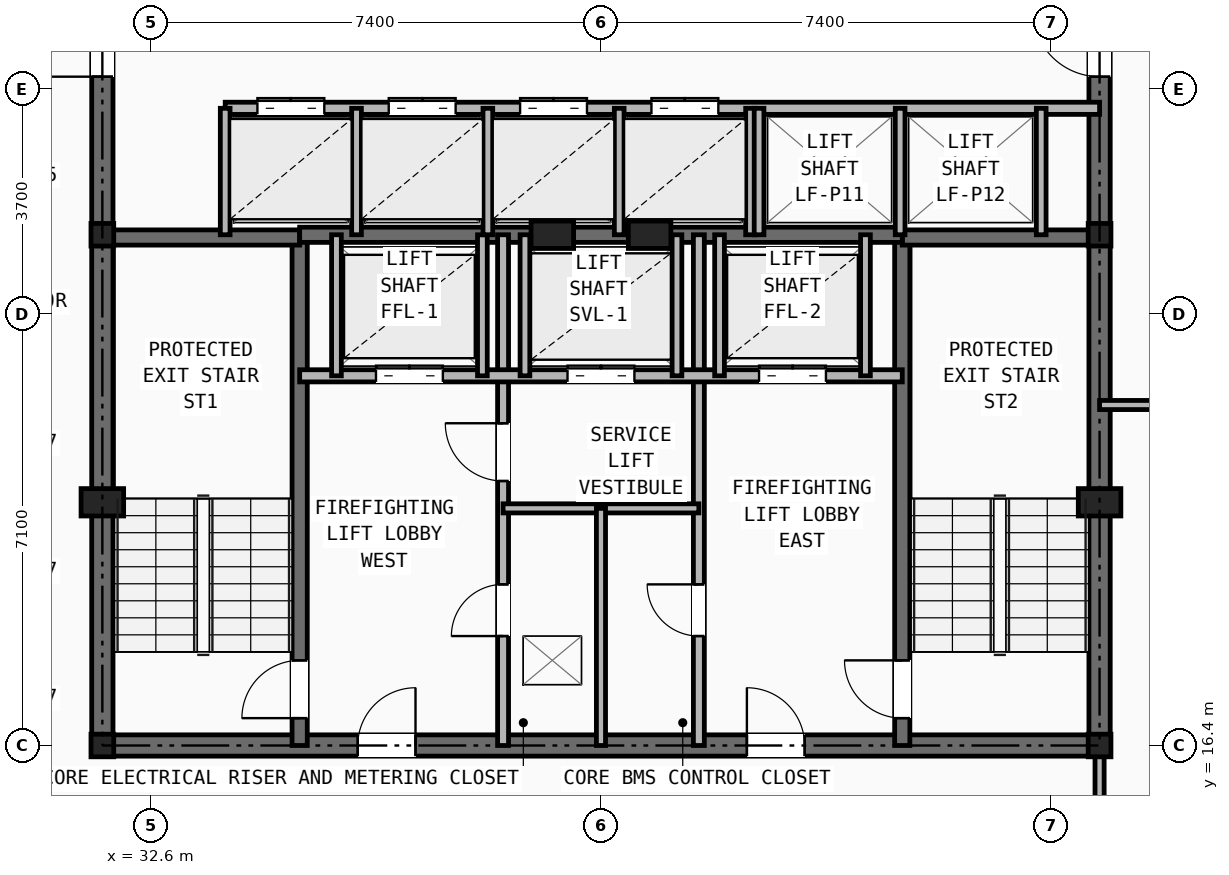
"""IFC4 building model, lengths in metres.
Left out: names, types, materials, properties, quantities, classifications, styles, units other than length and angle.
Written with IfcOpenShell. Run it as: python <this file> out.ifc"""

import sys

from ifc_helpers import new_model, si_unit, direction, frame, frame_2d, origin, origin_2d, place, context, subcontext, project, spatial, rectangle, i_section, extrude, element, fill, save


model = new_model("IFC4")
c1 = context("Model", 3, precision=1e-05, world=origin(), true_north=direction((0.0, 1.0)))
c2 = subcontext(c1, "Body", "Model", "MODEL_VIEW")
j1 = project(units=[si_unit("LENGTHUNIT", "METRE"), si_unit("PLANEANGLEUNIT", "RADIAN")], contexts=[c1])
p1 = place(None, origin())
s1 = spatial("IfcSite", under=j1, at=p1, CompositionType="ELEMENT")
p2 = place(p1, origin())
s2 = spatial("IfcBuilding", under=s1, at=p2, CompositionType="ELEMENT")
p3 = place(p2, frame((0.0, 0.0, 126.35)))
s3 = spatial("IfcBuildingStorey", under=s2, at=p3, CompositionType="ELEMENT", Elevation=126.35)
for number, where, z_axis, x_axis in (
    (1, (31.8, 16.4, 0.0), (0.0, 0.0, 1.0), (1.0, 0.0, 0.0)),
    (2, (48.2, 16.4, 0.0), (0.0, 0.0, 1.0), (1.0, 0.0, 0.0)),
    (3, (31.8, 24.8, 0.0), (0.0, 0.0, 1.0), (1.0, 0.0, 0.0)),
    (4, (48.2, 24.8, 0.0), (0.0, 0.0, 1.0), (1.0, 0.0, 0.0)),
):
    element("IfcColumn", number, at=place(p3, frame(where, z_axis=z_axis, x_axis=x_axis)), inside=s3, PredefinedType="COLUMN", context=c2, shape_type="SweptSolid", body=[
        extrude(i_section(OverallWidth=0.374, OverallDepth=0.372, WebThickness=0.016, FlangeThickness=0.026, at=origin_2d()), origin(), (0.0, 0.0, 1.0), 3.45),
    ])
for number, where, z_axis, x_axis in (
    (5, (31.8, 20.4, 0.0), (0.0, 0.0, 1.0), (1.0, 0.0, 0.0)),
    (6, (48.2, 20.4, 0.0), (0.0, 0.0, 1.0), (1.0, 0.0, 0.0)),
    (7, (39.2, 24.8, 0.0), (0.0, 0.0, 1.0), (1.0, 0.0, 0.0)),
    (8, (40.8, 24.8, 0.0), (0.0, 0.0, 1.0), (1.0, 0.0, 0.0)),
):
    element("IfcColumn", number, at=place(p3, frame(where, z_axis=z_axis, x_axis=x_axis)), inside=s3, PredefinedType="PILASTER", context=c2, shape_type="SweptSolid", body=[
        extrude(rectangle(XDim=0.7, YDim=0.45, at=origin_2d()), origin(), (0.0, 0.0, 1.0), 3.45),
    ])
p4 = place(p3, frame((31.8, 16.4, 0.0), z_axis=(0.0, 0.0, 1.0), x_axis=(1.0, 0.0, 0.0)))
e9 = element("IfcWall", 9, at=p4, inside=s3, PredefinedType="SHEAR", context=c2, shape_type="SweptSolid", body=[
    extrude(rectangle(XDim=16.4, YDim=0.35, at=frame_2d((8.2, 0.0))), origin(), (0.0, 0.0, 1.0), 3.21),
])
p5 = place(p4, frame((4.2, 0.0, 0.0)))
e10 = element("IfcOpeningElement", 10, at=p5, cuts=e9, PredefinedType="OPENING", context=c2, shape_type="SweptSolid", body=[
    extrude(rectangle(XDim=0.95, YDim=2.1, at=frame_2d((0.475, 1.05))), frame((0.0, 0.185, 0.0), z_axis=(0.0, -1.0, 0.0), x_axis=(1.0, 0.0, 0.0)), (0.0, 0.0, 1.0), 0.37),
])
p6 = place(p4, frame((10.6, 0.0, 0.0)))
e11 = element("IfcOpeningElement", 11, at=p6, cuts=e9, PredefinedType="OPENING", context=c2, shape_type="SweptSolid", body=[
    extrude(rectangle(XDim=0.95, YDim=2.1, at=frame_2d((0.475, 1.05))), frame((0.0, 0.185, 0.0), z_axis=(0.0, -1.0, 0.0), x_axis=(1.0, 0.0, 0.0)), (0.0, 0.0, 1.0), 0.37),
])
p7 = place(p3, frame((31.8, 16.4, 0.0), z_axis=(0.0, 0.0, 1.0), x_axis=(0.0, 1.0, 0.0)))
e12 = element("IfcWall", 12, at=p7, inside=s3, PredefinedType="SHEAR", context=c2, shape_type="SweptSolid", body=[
    extrude(rectangle(XDim=14.8, YDim=0.35, at=frame_2d((7.4, 0.0))), origin(), (0.0, 0.0, 1.0), 3.21),
])
p8 = place(p7, frame((11.0, 0.0, 0.0)))
e13 = element("IfcOpeningElement", 13, at=p8, cuts=e12, PredefinedType="OPENING", context=c2, shape_type="SweptSolid", body=[
    extrude(rectangle(XDim=1.1, YDim=2.15, at=frame_2d((0.55, 1.075))), frame((0.0, 0.185, 0.0), z_axis=(0.0, -1.0, 0.0), x_axis=(1.0, 0.0, 0.0)), (0.0, 0.0, 1.0), 0.37),
])
p9 = place(p3, frame((48.2, 16.4, 0.0), z_axis=(0.0, 0.0, 1.0), x_axis=(0.0, 1.0, 0.0)))
e14 = element("IfcWall", 14, at=p9, inside=s3, PredefinedType="SHEAR", context=c2, shape_type="SweptSolid", body=[
    extrude(rectangle(XDim=14.8, YDim=0.35, at=frame_2d((7.4, 0.0))), origin(), (0.0, 0.0, 1.0), 3.21),
])
p10 = place(p9, frame((11.0, 0.0, 0.0)))
e15 = element("IfcOpeningElement", 15, at=p10, cuts=e14, PredefinedType="OPENING", context=c2, shape_type="SweptSolid", body=[
    extrude(rectangle(XDim=1.1, YDim=2.15, at=frame_2d((0.55, 1.075))), frame((0.0, 0.185, 0.0), z_axis=(0.0, -1.0, 0.0), x_axis=(1.0, 0.0, 0.0)), (0.0, 0.0, 1.0), 0.37),
])
p11 = place(p3, frame((35.045, 16.4, 0.0), z_axis=(0.0, 0.0, 1.0), x_axis=(0.0, 1.0, 0.0)))
e16 = element("IfcWall", 16, at=p11, inside=s3, PredefinedType="SHEAR", context=c2, shape_type="SweptSolid", body=[
    extrude(rectangle(XDim=8.4, YDim=0.25, at=frame_2d((4.2, 0.0))), origin(), (0.0, 0.0, 1.0), 3.21),
])
p12 = place(p11, frame((0.45, 0.0, 0.0)))
e17 = element("IfcOpeningElement", 17, at=p12, cuts=e16, PredefinedType="OPENING", context=c2, shape_type="SweptSolid", body=[
    extrude(rectangle(XDim=0.95, YDim=2.1, at=frame_2d((0.475, 1.05))), frame((0.0, 0.135, 0.0), z_axis=(0.0, -1.0, 0.0), x_axis=(1.0, 0.0, 0.0)), (0.0, 0.0, 1.0), 0.27),
])
p13 = place(p3, frame((31.8, 24.755, 0.0), z_axis=(0.0, 0.0, 1.0), x_axis=(1.0, 0.0, 0.0)))
e18 = element("IfcWall", 18, at=p13, inside=s3, PredefinedType="SHEAR", context=c2, shape_type="SweptSolid", body=[
    extrude(rectangle(XDim=3.245, YDim=0.25, at=frame_2d((1.623, 0.0))), origin(), (0.0, 0.0, 1.0), 3.21),
])
p14 = place(p3, frame((44.955, 16.4, 0.0), z_axis=(0.0, 0.0, 1.0), x_axis=(0.0, 1.0, 0.0)))
e19 = element("IfcWall", 19, at=p14, inside=s3, PredefinedType="SHEAR", context=c2, shape_type="SweptSolid", body=[
    extrude(rectangle(XDim=8.4, YDim=0.25, at=frame_2d((4.2, 0.0))), origin(), (0.0, 0.0, 1.0), 3.21),
])
p15 = place(p14, frame((0.45, 0.0, 0.0)))
e20 = element("IfcOpeningElement", 20, at=p15, cuts=e19, PredefinedType="OPENING", context=c2, shape_type="SweptSolid", body=[
    extrude(rectangle(XDim=0.95, YDim=2.1, at=frame_2d((0.475, 1.05))), frame((0.0, 0.135, 0.0), z_axis=(0.0, -1.0, 0.0), x_axis=(1.0, 0.0, 0.0)), (0.0, 0.0, 1.0), 0.27),
])
p16 = place(p3, frame((44.955, 24.755, 0.0), z_axis=(0.0, 0.0, 1.0), x_axis=(1.0, 0.0, 0.0)))
e21 = element("IfcWall", 21, at=p16, inside=s3, PredefinedType="SHEAR", context=c2, shape_type="SweptSolid", body=[
    extrude(rectangle(XDim=3.245, YDim=0.25, at=frame_2d((1.623, 0.0))), origin(), (0.0, 0.0, 1.0), 3.21),
])
p17 = place(p3, frame((35.045, 24.8, 0.0), z_axis=(0.0, 0.0, 1.0), x_axis=(1.0, 0.0, 0.0)))
e22 = element("IfcWall", 22, at=p17, inside=s3, PredefinedType="SHEAR", context=c2, shape_type="SweptSolid", body=[
    extrude(rectangle(XDim=9.91, YDim=0.25, at=frame_2d((4.955, 0.0))), origin(), (0.0, 0.0, 1.0), 3.21),
])
p18 = place(p3, frame((38.39, 16.4, 0.0), z_axis=(0.0, 0.0, 1.0), x_axis=(0.0, 1.0, 0.0)))
e23 = element("IfcWall", 23, at=p18, inside=s3, PredefinedType="PARTITIONING", context=c2, shape_type="SweptSolid", body=[
    extrude(rectangle(XDim=8.4, YDim=0.18, at=frame_2d((4.2, 0.0))), origin(), (0.0, 0.0, 1.0), 2.661),
])
p19 = place(p18, frame((1.8, 0.0, 0.0)))
e24 = element("IfcOpeningElement", 24, at=p19, cuts=e23, PredefinedType="OPENING", context=c2, shape_type="SweptSolid", body=[
    extrude(rectangle(XDim=0.85, YDim=2.05, at=frame_2d((0.425, 1.025))), frame((0.0, 0.1, 0.0), z_axis=(0.0, -1.0, 0.0), x_axis=(1.0, 0.0, 0.0)), (0.0, 0.0, 1.0), 0.2),
])
p20 = place(p18, frame((4.35, 0.0, 0.0)))
e25 = element("IfcOpeningElement", 25, at=p20, cuts=e23, PredefinedType="OPENING", context=c2, shape_type="SweptSolid", body=[
    extrude(rectangle(XDim=0.95, YDim=2.1, at=frame_2d((0.475, 1.05))), frame((0.0, 0.1, 0.0), z_axis=(0.0, -1.0, 0.0), x_axis=(1.0, 0.0, 0.0)), (0.0, 0.0, 1.0), 0.2),
])
p21 = place(p3, frame((41.61, 16.4, 0.0), z_axis=(0.0, 0.0, 1.0), x_axis=(0.0, 1.0, 0.0)))
e26 = element("IfcWall", 26, at=p21, inside=s3, PredefinedType="PARTITIONING", context=c2, shape_type="SweptSolid", body=[
    extrude(rectangle(XDim=8.4, YDim=0.18, at=frame_2d((4.2, 0.0))), origin(), (0.0, 0.0, 1.0), 2.661),
])
p22 = place(p21, frame((1.8, 0.0, 0.0)))
e27 = element("IfcOpeningElement", 27, at=p22, cuts=e26, PredefinedType="OPENING", context=c2, shape_type="SweptSolid", body=[
    extrude(rectangle(XDim=0.85, YDim=2.05, at=frame_2d((0.425, 1.025))), frame((0.0, 0.1, 0.0), z_axis=(0.0, -1.0, 0.0), x_axis=(1.0, 0.0, 0.0)), (0.0, 0.0, 1.0), 0.2),
])
p23 = place(p3, frame((35.045, 22.48, 0.0), z_axis=(0.0, 0.0, 1.0), x_axis=(1.0, 0.0, 0.0)))
e28 = element("IfcWall", 28, at=p23, inside=s3, PredefinedType="SOLIDWALL", context=c2, shape_type="SweptSolid", body=[
    extrude(rectangle(XDim=9.91, YDim=0.2, at=frame_2d((4.955, 0.0))), origin(), (0.0, 0.0, 1.0), 3.21),
])
p24 = place(p23, frame((1.255, 0.0, 0.0)))
e29 = element("IfcOpeningElement", 29, at=p24, cuts=e28, PredefinedType="OPENING", context=c2, shape_type="SweptSolid", body=[
    extrude(rectangle(XDim=1.1, YDim=2.15, at=frame_2d((0.55, 1.075))), frame((0.0, 0.11, 0.0), z_axis=(0.0, -1.0, 0.0), x_axis=(1.0, 0.0, 0.0)), (0.0, 0.0, 1.0), 0.22),
])
p25 = place(p23, frame((7.555, 0.0, 0.0)))
e30 = element("IfcOpeningElement", 30, at=p25, cuts=e28, PredefinedType="OPENING", context=c2, shape_type="SweptSolid", body=[
    extrude(rectangle(XDim=1.1, YDim=2.15, at=frame_2d((0.55, 1.075))), frame((0.0, 0.11, 0.0), z_axis=(0.0, -1.0, 0.0), x_axis=(1.0, 0.0, 0.0)), (0.0, 0.0, 1.0), 0.22),
])
p26 = place(p23, frame((4.405, 0.0, 0.0)))
e31 = element("IfcOpeningElement", 31, at=p26, cuts=e28, PredefinedType="OPENING", context=c2, shape_type="SweptSolid", body=[
    extrude(rectangle(XDim=1.1, YDim=2.15, at=frame_2d((0.55, 1.075))), frame((0.0, 0.11, 0.0), z_axis=(0.0, -1.0, 0.0), x_axis=(1.0, 0.0, 0.0)), (0.0, 0.0, 1.0), 0.22),
])
p27 = place(p3, frame((38.39, 20.3, 0.0), z_axis=(0.0, 0.0, 1.0), x_axis=(1.0, 0.0, 0.0)))
e32 = element("IfcWall", 32, at=p27, inside=s3, PredefinedType="PARTITIONING", context=c2, shape_type="SweptSolid", body=[
    extrude(rectangle(XDim=3.22, YDim=0.15, at=frame_2d((1.61, 0.0))), origin(), (0.0, 0.0, 1.0), 3.21),
])
p28 = place(p3, frame((40.0, 16.4, 0.0), z_axis=(0.0, 0.0, 1.0), x_axis=(0.0, 1.0, 0.0)))
e33 = element("IfcWall", 33, at=p28, inside=s3, PredefinedType="PARTITIONING", context=c2, shape_type="SweptSolid", body=[
    extrude(rectangle(XDim=3.9, YDim=0.15, at=frame_2d((1.95, 0.0))), origin(), (0.0, 0.0, 1.0), 2.661),
])
for number, where, z_axis, x_axis in (
    (34, (35.65, 22.48, 0.0), (0.0, 0.0, 1.0), (0.0, 1.0, 0.0)),
    (35, (38.05, 22.48, 0.0), (0.0, 0.0, 1.0), (0.0, 1.0, 0.0)),
    (36, (41.95, 22.48, 0.0), (0.0, 0.0, 1.0), (0.0, 1.0, 0.0)),
    (37, (44.35, 22.48, 0.0), (0.0, 0.0, 1.0), (0.0, 1.0, 0.0)),
    (38, (38.75, 22.48, 0.0), (0.0, 0.0, 1.0), (0.0, 1.0, 0.0)),
    (39, (41.25, 22.48, 0.0), (0.0, 0.0, 1.0), (0.0, 1.0, 0.0)),
):
    element("IfcWall", number, at=place(p3, frame(where, z_axis=z_axis, x_axis=x_axis)), inside=s3, PredefinedType="SOLIDWALL", context=c2, shape_type="SweptSolid", body=[
        extrude(rectangle(XDim=2.32, YDim=0.16, at=frame_2d((1.16, 0.0))), origin(), (0.0, 0.0, 1.0), 3.21),
    ])
p29 = place(p3, frame((33.82, 26.88, 0.0), z_axis=(0.0, 0.0, 1.0), x_axis=(1.0, 0.0, 0.0)))
e40 = element("IfcWall", 40, at=p29, inside=s3, PredefinedType="SOLIDWALL", context=c2, shape_type="SweptSolid", body=[
    extrude(rectangle(XDim=14.38, YDim=0.2, at=frame_2d((7.19, 0.0))), origin(), (0.0, 0.0, 1.0), 2.661),
])
p30 = place(p29, frame((0.53, 0.0, 0.0)))
e41 = element("IfcOpeningElement", 41, at=p30, cuts=e40, PredefinedType="OPENING", context=c2, shape_type="SweptSolid", body=[
    extrude(rectangle(XDim=1.1, YDim=2.15, at=frame_2d((0.55, 1.075))), frame((0.0, 0.11, 0.0), z_axis=(0.0, -1.0, 0.0), x_axis=(1.0, 0.0, 0.0)), (0.0, 0.0, 1.0), 0.22),
])
p31 = place(p29, frame((2.69, 0.0, 0.0)))
e42 = element("IfcOpeningElement", 42, at=p31, cuts=e40, PredefinedType="OPENING", context=c2, shape_type="SweptSolid", body=[
    extrude(rectangle(XDim=1.1, YDim=2.15, at=frame_2d((0.55, 1.075))), frame((0.0, 0.11, 0.0), z_axis=(0.0, -1.0, 0.0), x_axis=(1.0, 0.0, 0.0)), (0.0, 0.0, 1.0), 0.22),
])
p32 = place(p29, frame((4.85, 0.0, 0.0)))
e43 = element("IfcOpeningElement", 43, at=p32, cuts=e40, PredefinedType="OPENING", context=c2, shape_type="SweptSolid", body=[
    extrude(rectangle(XDim=1.1, YDim=2.15, at=frame_2d((0.55, 1.075))), frame((0.0, 0.11, 0.0), z_axis=(0.0, -1.0, 0.0), x_axis=(1.0, 0.0, 0.0)), (0.0, 0.0, 1.0), 0.22),
])
p33 = place(p29, frame((7.01, 0.0, 0.0)))
e44 = element("IfcOpeningElement", 44, at=p33, cuts=e40, PredefinedType="OPENING", context=c2, shape_type="SweptSolid", body=[
    extrude(rectangle(XDim=1.1, YDim=2.15, at=frame_2d((0.55, 1.075))), frame((0.0, 0.11, 0.0), z_axis=(0.0, -1.0, 0.0), x_axis=(1.0, 0.0, 0.0)), (0.0, 0.0, 1.0), 0.22),
])
for number, where, z_axis, x_axis in (
    (45, (33.82, 24.8, 0.0), (0.0, 0.0, 1.0), (0.0, 1.0, 0.0)),
    (46, (35.98, 24.8, 0.0), (0.0, 0.0, 1.0), (0.0, 1.0, 0.0)),
    (47, (38.14, 24.8, 0.0), (0.0, 0.0, 1.0), (0.0, 1.0, 0.0)),
    (48, (40.3, 24.8, 0.0), (0.0, 0.0, 1.0), (0.0, 1.0, 0.0)),
    (49, (42.46, 24.8, 0.0), (0.0, 0.0, 1.0), (0.0, 1.0, 0.0)),
    (50, (42.6, 24.8, 0.0), (0.0, 0.0, 1.0), (0.0, 1.0, 0.0)),
    (51, (44.92, 24.8, 0.0), (0.0, 0.0, 1.0), (0.0, 1.0, 0.0)),
    (52, (47.24, 24.8, 0.0), (0.0, 0.0, 1.0), (0.0, 1.0, 0.0)),
):
    element("IfcWall", number, at=place(p3, frame(where, z_axis=z_axis, x_axis=x_axis)), inside=s3, PredefinedType="SOLIDWALL", context=c2, shape_type="SweptSolid", body=[
        extrude(rectangle(XDim=2.08, YDim=0.16, at=frame_2d((1.04, 0.0))), origin(), (0.0, 0.0, 1.0), 3.21),
    ])
p34 = place(p3, frame((48.2, 14.1, 0.0), z_axis=(0.0, 0.0, 1.0), x_axis=(0.0, 1.0, 0.0)))
e53 = element("IfcWall", 53, at=p34, inside=s3, PredefinedType="PARTITIONING", context=c2, shape_type="SweptSolid", body=[
    extrude(rectangle(XDim=2.3, YDim=0.15, at=frame_2d((1.15, 0.0))), origin(), (0.0, 0.0, 1.0), 2.661),
])
p35 = place(p3, frame((48.2, 22.0, 0.0), z_axis=(0.0, 0.0, 1.0), x_axis=(1.0, 0.0, 0.0)))
e54 = element("IfcWall", 54, at=p35, inside=s3, PredefinedType="PARTITIONING", context=c2, shape_type="SweptSolid", body=[
    extrude(rectangle(XDim=14.262, YDim=0.15, at=frame_2d((7.131, 0.0))), origin(), (0.0, 0.0, 1.0), 2.589),
])
p36 = place(p35, frame((1.4, 0.0, 0.0)))
e55 = element("IfcOpeningElement", 55, at=p36, cuts=e54, PredefinedType="OPENING", context=c2, shape_type="SweptSolid", body=[
    extrude(rectangle(XDim=0.95, YDim=2.1, at=frame_2d((0.475, 1.05))), frame((0.0, 0.085, 0.0), z_axis=(0.0, -1.0, 0.0), x_axis=(1.0, 0.0, 0.0)), (0.0, 0.0, 1.0), 0.17),
])
p37 = place(p19, origin())
e56 = element("IfcDoor", 56, at=p37, inside=s3, OperationType="SINGLE_SWING_LEFT", PredefinedType="DOOR", context=c2, shape_type="SweptSolid", body=[
    extrude(rectangle(XDim=0.85, YDim=2.05, at=frame_2d((0.425, 1.025))), frame((0.0, 0.025, 0.0), z_axis=(0.0, -1.0, 0.0), x_axis=(1.0, 0.0, 0.0)), (0.0, 0.0, 1.0), 0.05),
])
fill(e24, e56)
p38 = place(p22, origin())
e57 = element("IfcDoor", 57, at=p38, inside=s3, OperationType="SINGLE_SWING_RIGHT", PredefinedType="DOOR", context=c2, shape_type="SweptSolid", body=[
    extrude(rectangle(XDim=0.85, YDim=2.05, at=frame_2d((0.425, 1.025))), frame((0.0, 0.025, 0.0), z_axis=(0.0, -1.0, 0.0), x_axis=(1.0, 0.0, 0.0)), (0.0, 0.0, 1.0), 0.05),
])
fill(e27, e57)
p39 = place(p20, origin())
e58 = element("IfcDoor", 58, at=p39, inside=s3, OperationType="SINGLE_SWING_RIGHT", PredefinedType="DOOR", context=c2, shape_type="SweptSolid", body=[
    extrude(rectangle(XDim=0.95, YDim=2.1, at=frame_2d((0.475, 1.05))), frame((0.0, 0.025, 0.0), z_axis=(0.0, -1.0, 0.0), x_axis=(1.0, 0.0, 0.0)), (0.0, 0.0, 1.0), 0.05),
])
fill(e25, e58)
p40 = place(p12, origin())
e59 = element("IfcDoor", 59, at=p40, inside=s3, OperationType="SINGLE_SWING_LEFT", PredefinedType="DOOR", context=c2, shape_type="SweptSolid", body=[
    extrude(rectangle(XDim=0.95, YDim=2.1, at=frame_2d((0.475, 1.05))), frame((0.0, 0.025, 0.0), z_axis=(0.0, -1.0, 0.0), x_axis=(1.0, 0.0, 0.0)), (0.0, 0.0, 1.0), 0.05),
])
fill(e17, e59)
p41 = place(p15, origin())
e60 = element("IfcDoor", 60, at=p41, inside=s3, OperationType="SINGLE_SWING_RIGHT", PredefinedType="DOOR", context=c2, shape_type="SweptSolid", body=[
    extrude(rectangle(XDim=0.95, YDim=2.1, at=frame_2d((0.475, 1.05))), frame((0.0, 0.025, 0.0), z_axis=(0.0, -1.0, 0.0), x_axis=(1.0, 0.0, 0.0)), (0.0, 0.0, 1.0), 0.05),
])
fill(e20, e60)
p42 = place(p5, origin())
e61 = element("IfcDoor", 61, at=p42, inside=s3, OperationType="SINGLE_SWING_RIGHT", PredefinedType="DOOR", context=c2, shape_type="SweptSolid", body=[
    extrude(rectangle(XDim=0.95, YDim=2.1, at=frame_2d((0.475, 1.05))), frame((0.0, 0.025, 0.0), z_axis=(0.0, -1.0, 0.0), x_axis=(1.0, 0.0, 0.0)), (0.0, 0.0, 1.0), 0.05),
])
fill(e10, e61)
p43 = place(p6, origin())
e62 = element("IfcDoor", 62, at=p43, inside=s3, OperationType="SINGLE_SWING_LEFT", PredefinedType="DOOR", context=c2, shape_type="SweptSolid", body=[
    extrude(rectangle(XDim=0.95, YDim=2.1, at=frame_2d((0.475, 1.05))), frame((0.0, 0.025, 0.0), z_axis=(0.0, -1.0, 0.0), x_axis=(1.0, 0.0, 0.0)), (0.0, 0.0, 1.0), 0.05),
])
fill(e11, e62)
p44 = place(p24, origin())
e63 = element("IfcDoor", 63, at=p44, inside=s3, OperationType="DOUBLE_DOOR_SLIDING", PredefinedType="DOOR", context=c2, shape_type="SweptSolid", body=[
    extrude(rectangle(XDim=1.1, YDim=2.15, at=frame_2d((0.55, 1.075))), frame((0.0, 0.025, 0.0), z_axis=(0.0, -1.0, 0.0), x_axis=(1.0, 0.0, 0.0)), (0.0, 0.0, 1.0), 0.05),
])
fill(e29, e63)
p45 = place(p25, origin())
e64 = element("IfcDoor", 64, at=p45, inside=s3, OperationType="DOUBLE_DOOR_SLIDING", PredefinedType="DOOR", context=c2, shape_type="SweptSolid", body=[
    extrude(rectangle(XDim=1.1, YDim=2.15, at=frame_2d((0.55, 1.075))), frame((0.0, 0.025, 0.0), z_axis=(0.0, -1.0, 0.0), x_axis=(1.0, 0.0, 0.0)), (0.0, 0.0, 1.0), 0.05),
])
fill(e30, e64)
p46 = place(p26, origin())
e65 = element("IfcDoor", 65, at=p46, inside=s3, OperationType="DOUBLE_DOOR_SLIDING", PredefinedType="DOOR", context=c2, shape_type="SweptSolid", body=[
    extrude(rectangle(XDim=1.1, YDim=2.15, at=frame_2d((0.55, 1.075))), frame((0.0, 0.025, 0.0), z_axis=(0.0, -1.0, 0.0), x_axis=(1.0, 0.0, 0.0)), (0.0, 0.0, 1.0), 0.05),
])
fill(e31, e65)
p47 = place(p8, origin())
e66 = element("IfcDoor", 66, at=p47, inside=s3, OperationType="SINGLE_SWING_LEFT", PredefinedType="DOOR", context=c2, shape_type="SweptSolid", body=[
    extrude(rectangle(XDim=1.1, YDim=2.15, at=frame_2d((0.55, 1.075))), frame((0.0, 0.025, 0.0), z_axis=(0.0, -1.0, 0.0), x_axis=(1.0, 0.0, 0.0)), (0.0, 0.0, 1.0), 0.05),
])
fill(e13, e66)
p48 = place(p10, origin())
e67 = element("IfcDoor", 67, at=p48, inside=s3, OperationType="SINGLE_SWING_RIGHT", PredefinedType="DOOR", context=c2, shape_type="SweptSolid", body=[
    extrude(rectangle(XDim=1.1, YDim=2.15, at=frame_2d((0.55, 1.075))), frame((0.0, 0.025, 0.0), z_axis=(0.0, -1.0, 0.0), x_axis=(1.0, 0.0, 0.0)), (0.0, 0.0, 1.0), 0.05),
])
fill(e15, e67)
p49 = place(p30, origin())
e68 = element("IfcDoor", 68, at=p49, inside=s3, OperationType="DOUBLE_DOOR_SLIDING", PredefinedType="DOOR", context=c2, shape_type="SweptSolid", body=[
    extrude(rectangle(XDim=1.1, YDim=2.15, at=frame_2d((0.55, 1.075))), frame((0.0, 0.025, 0.0), z_axis=(0.0, -1.0, 0.0), x_axis=(1.0, 0.0, 0.0)), (0.0, 0.0, 1.0), 0.05),
])
fill(e41, e68)
p50 = place(p31, origin())
e69 = element("IfcDoor", 69, at=p50, inside=s3, OperationType="DOUBLE_DOOR_SLIDING", PredefinedType="DOOR", context=c2, shape_type="SweptSolid", body=[
    extrude(rectangle(XDim=1.1, YDim=2.15, at=frame_2d((0.55, 1.075))), frame((0.0, 0.025, 0.0), z_axis=(0.0, -1.0, 0.0), x_axis=(1.0, 0.0, 0.0)), (0.0, 0.0, 1.0), 0.05),
])
fill(e42, e69)
p51 = place(p32, origin())
e70 = element("IfcDoor", 70, at=p51, inside=s3, OperationType="DOUBLE_DOOR_SLIDING", PredefinedType="DOOR", context=c2, shape_type="SweptSolid", body=[
    extrude(rectangle(XDim=1.1, YDim=2.15, at=frame_2d((0.55, 1.075))), frame((0.0, 0.025, 0.0), z_axis=(0.0, -1.0, 0.0), x_axis=(1.0, 0.0, 0.0)), (0.0, 0.0, 1.0), 0.05),
])
fill(e43, e70)
p52 = place(p33, origin())
e71 = element("IfcDoor", 71, at=p52, inside=s3, OperationType="DOUBLE_DOOR_SLIDING", PredefinedType="DOOR", context=c2, shape_type="SweptSolid", body=[
    extrude(rectangle(XDim=1.1, YDim=2.15, at=frame_2d((0.55, 1.075))), frame((0.0, 0.025, 0.0), z_axis=(0.0, -1.0, 0.0), x_axis=(1.0, 0.0, 0.0)), (0.0, 0.0, 1.0), 0.05),
])
fill(e44, e71)
save(model, sys.argv[1])
